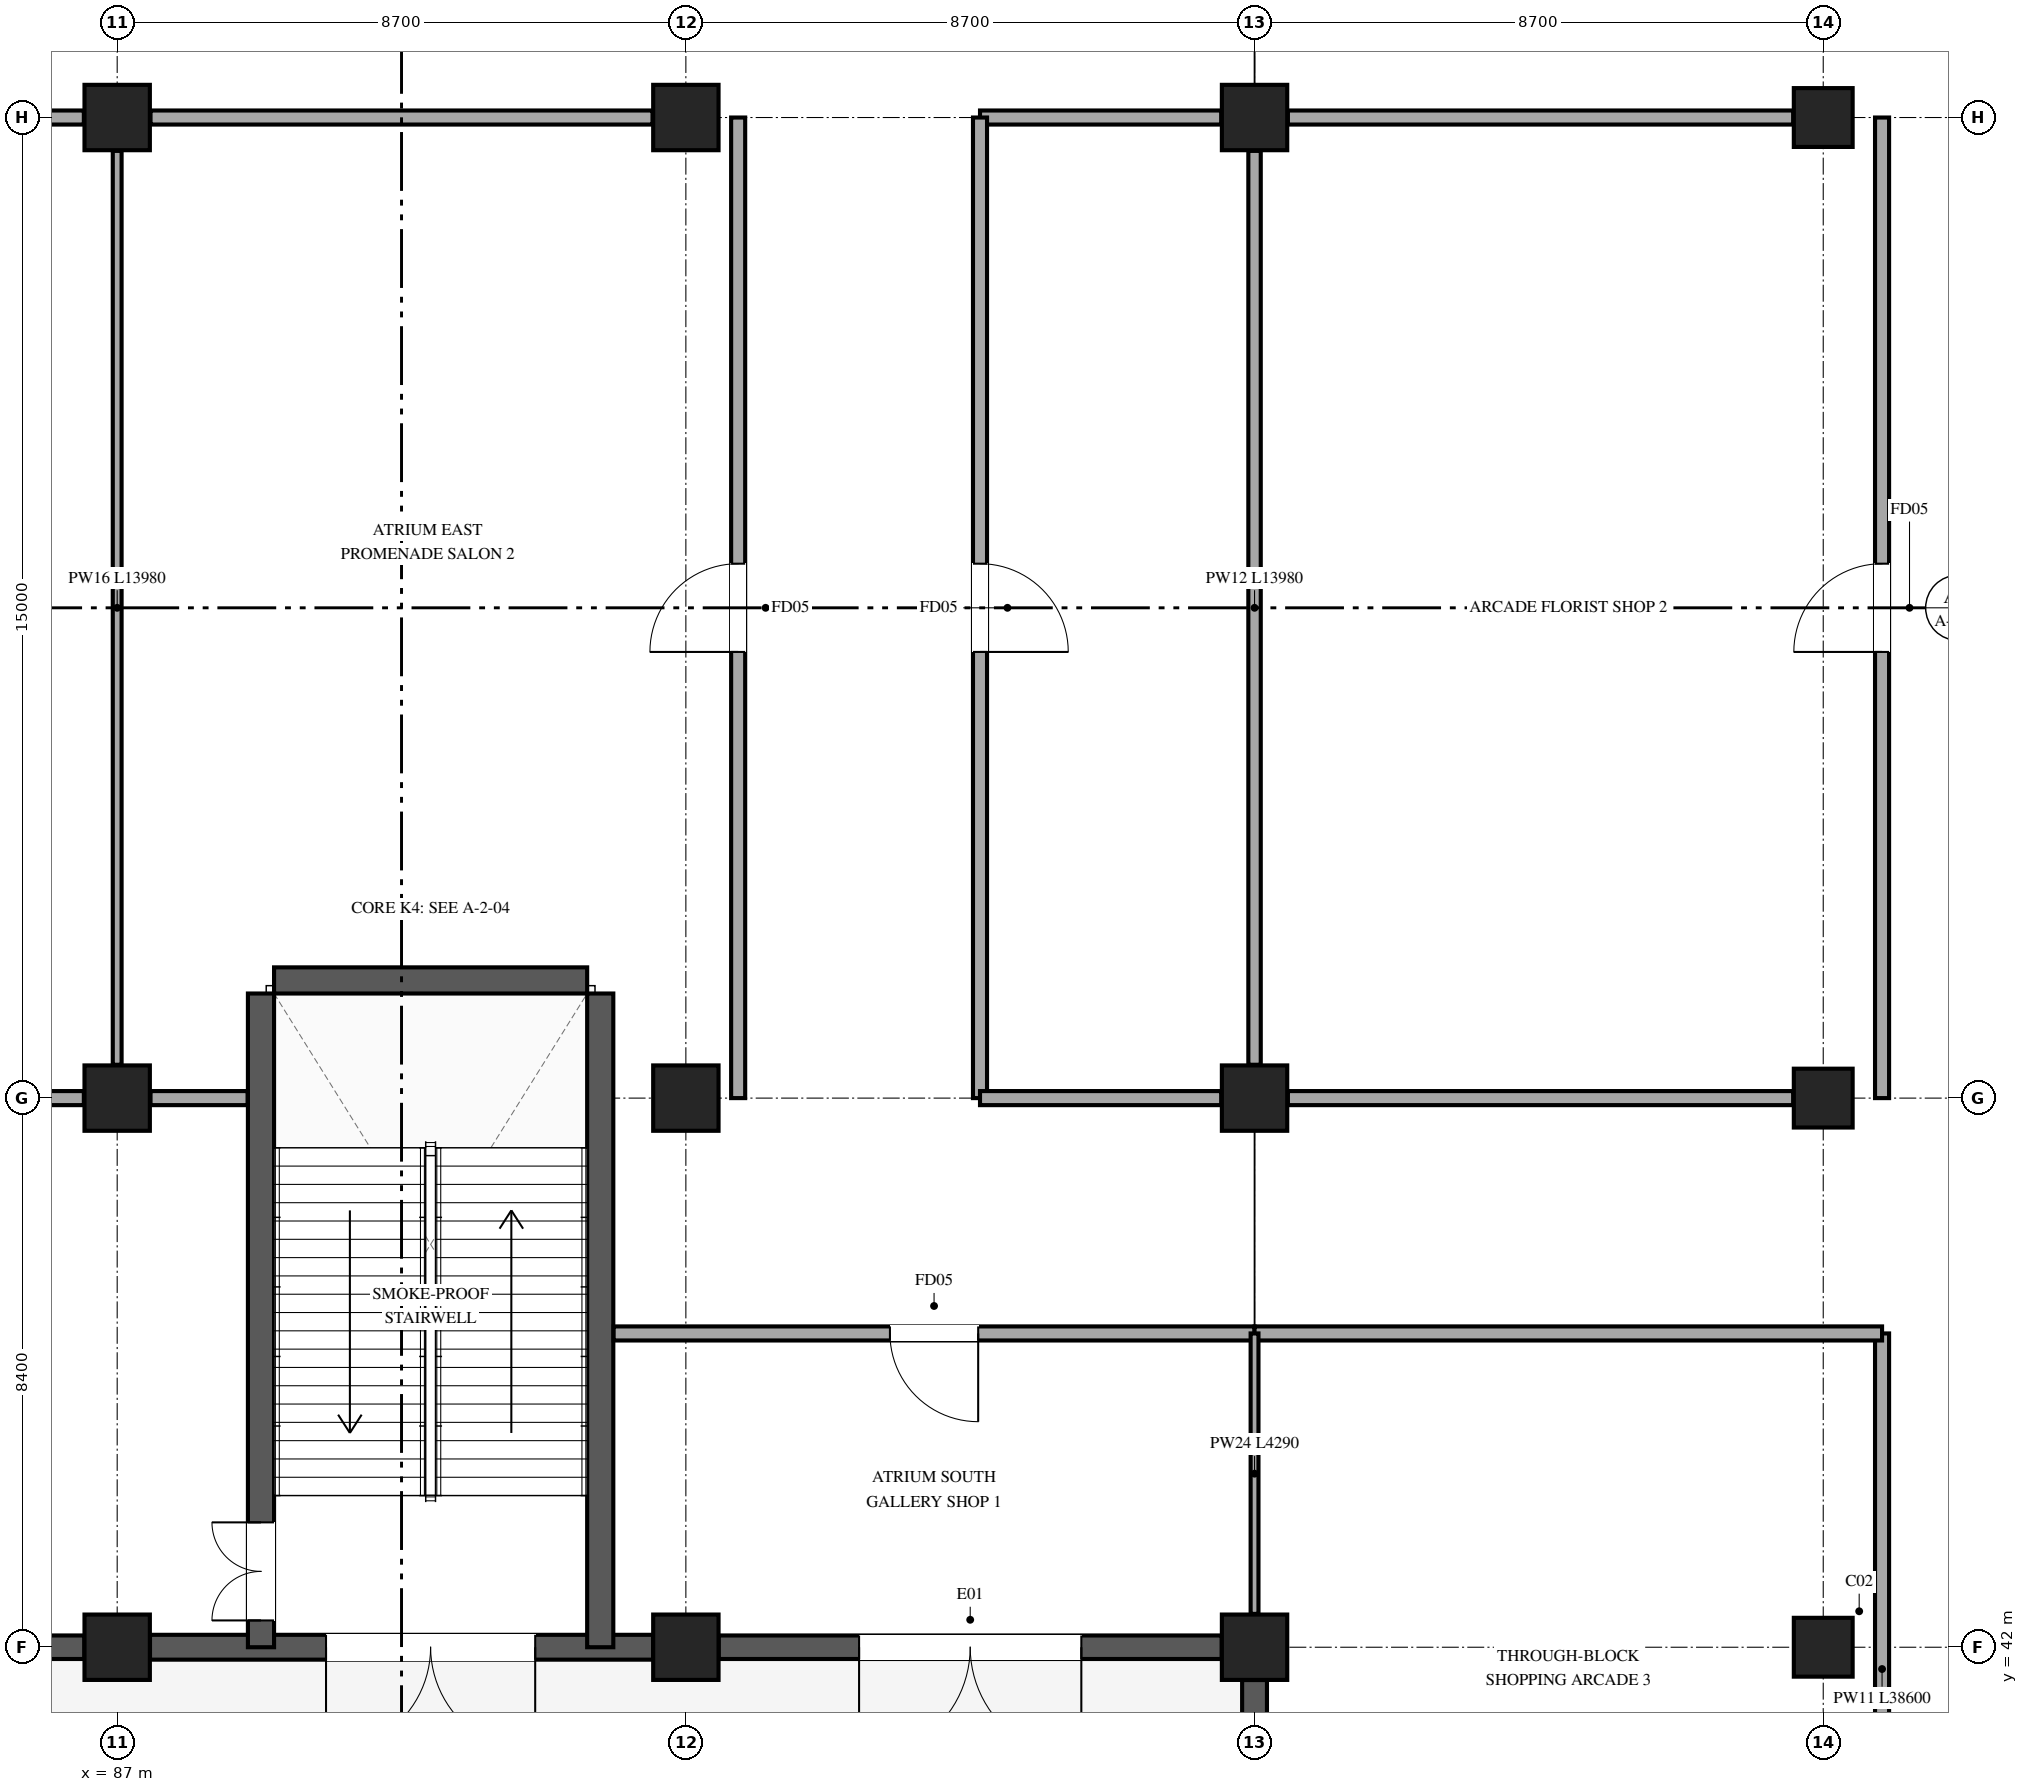
"""IFC4 building model, lengths in metres.
Left out: names, types, materials, properties, quantities, classifications, styles, units other than length and angle.
Written with IfcOpenShell. Run it as: python <this file> out.ifc"""

import sys

from ifc_helpers import new_model, si_unit, direction, frame, frame_2d, origin, origin_2d, place, context, subcontext, project, spatial, rectangle, extrude, element, fill, save


model = new_model("IFC4")
c1 = context("Model", 3, precision=1e-05, world=origin(), true_north=direction((0.0, 1.0)))
c2 = subcontext(c1, "Body", "Model", "MODEL_VIEW")
j1 = project(units=[si_unit("LENGTHUNIT", "METRE"), si_unit("PLANEANGLEUNIT", "RADIAN")], contexts=[c1])
p1 = place(None, origin())
s1 = spatial("IfcSite", under=j1, at=p1, CompositionType="ELEMENT")
p2 = place(p1, origin())
s2 = spatial("IfcBuilding", under=s1, at=p2, CompositionType="ELEMENT")
p3 = place(p2, origin())
s3 = spatial("IfcBuildingStorey", under=s2, at=p3, CompositionType="ELEMENT", Elevation=0.0)
for number, where, z_axis, x_axis in (
    (1, (87.0, 42.0, 0.0), (0.0, 0.0, 1.0), (1.0, 0.0, 0.0)),
    (2, (87.0, 50.4, 0.0), (0.0, 0.0, 1.0), (1.0, 0.0, 0.0)),
    (3, (87.0, 65.4, 0.0), (0.0, 0.0, 1.0), (1.0, 0.0, 0.0)),
    (4, (95.7, 42.0, 0.0), (0.0, 0.0, 1.0), (1.0, 0.0, 0.0)),
    (5, (95.7, 50.4, 0.0), (0.0, 0.0, 1.0), (1.0, 0.0, 0.0)),
    (6, (95.7, 65.4, 0.0), (0.0, 0.0, 1.0), (1.0, 0.0, 0.0)),
    (7, (104.4, 42.0, 0.0), (0.0, 0.0, 1.0), (1.0, 0.0, 0.0)),
    (8, (104.4, 50.4, 0.0), (0.0, 0.0, 1.0), (1.0, 0.0, 0.0)),
    (9, (104.4, 65.4, 0.0), (0.0, 0.0, 1.0), (1.0, 0.0, 0.0)),
):
    element("IfcColumn", number, at=place(p3, frame(where, z_axis=z_axis, x_axis=x_axis)), inside=s3, PredefinedType="COLUMN", context=c2, shape_type="SweptSolid", body=[
        extrude(rectangle(XDim=1.0, YDim=1.0, at=origin_2d()), origin(), (0.0, 0.0, 1.0), 6.0),
    ])
for number, where, z_axis, x_axis in (
    (10, (113.1, 42.0, 0.0), (0.0, 0.0, 1.0), (1.0, 0.0, 0.0)),
    (11, (113.1, 50.4, 0.0), (0.0, 0.0, 1.0), (1.0, 0.0, 0.0)),
    (12, (113.1, 65.4, 0.0), (0.0, 0.0, 1.0), (1.0, 0.0, 0.0)),
):
    element("IfcColumn", number, at=place(p3, frame(where, z_axis=z_axis, x_axis=x_axis)), inside=s3, PredefinedType="COLUMN", context=c2, shape_type="SweptSolid", body=[
        extrude(rectangle(XDim=0.9, YDim=0.9, at=origin_2d()), origin(), (0.0, 0.0, 1.0), 6.0),
    ])
p4 = place(p3, frame((104.4, 34.052, 0.0), z_axis=(0.0, 0.0, 1.0), x_axis=(0.0, 1.0, 0.0)))
e13 = element("IfcWall", 13, at=p4, inside=s3, PredefinedType="STANDARD", context=c2, shape_type="SweptSolid", body=[
    extrude(rectangle(XDim=7.446, YDim=0.38, at=frame_2d((3.723, 0.0))), origin(), (0.0, 0.0, 1.0), 5.66),
])
p5 = place(p4, frame((2.323, 0.0, 0.0)))
e14 = element("IfcOpeningElement", 14, at=p5, cuts=e13, PredefinedType="OPENING", context=c2, shape_type="SweptSolid", body=[
    extrude(rectangle(XDim=2.8, YDim=2.5, at=frame_2d((1.4, 1.25))), frame((0.0, 0.2, 0.0), z_axis=(0.0, -1.0, 0.0), x_axis=(1.0, 0.0, 0.0)), (0.0, 0.0, 1.0), 0.4),
])
p6 = place(p3, frame((103.898, 42.0, 0.0), z_axis=(0.0, 0.0, 1.0), x_axis=(-1.0, 0.0, 0.0)))
e15 = element("IfcWall", 15, at=p6, inside=s3, PredefinedType="STANDARD", context=c2, shape_type="SweptSolid", body=[
    extrude(rectangle(XDim=7.696, YDim=0.36, at=frame_2d((3.848, 0.0))), origin(), (0.0, 0.0, 1.0), 5.66),
])
p7 = place(p6, frame((2.148, 0.0, 0.0)))
e16 = element("IfcOpeningElement", 16, at=p7, cuts=e15, PredefinedType="OPENING", context=c2, shape_type="SweptSolid", body=[
    extrude(rectangle(XDim=3.4, YDim=2.8, at=frame_2d((1.7, 1.4))), frame((0.0, 0.19, 0.0), z_axis=(0.0, -1.0, 0.0), x_axis=(1.0, 0.0, 0.0)), (0.0, 0.0, 1.0), 0.38),
])
p8 = place(p3, frame((95.198, 42.0, 0.0), z_axis=(0.0, 0.0, 1.0), x_axis=(-1.0, 0.0, 0.0)))
e17 = element("IfcWall", 17, at=p8, inside=s3, PredefinedType="STANDARD", context=c2, shape_type="SweptSolid", body=[
    extrude(rectangle(XDim=7.696, YDim=0.38, at=frame_2d((3.848, 0.0))), origin(), (0.0, 0.0, 1.0), 5.66),
])
p9 = place(p8, frame((1.803, 0.0, 0.0)))
e18 = element("IfcOpeningElement", 18, at=p9, cuts=e17, PredefinedType="OPENING", context=c2, shape_type="SweptSolid", body=[
    extrude(rectangle(XDim=3.2, YDim=2.4, at=frame_2d((1.6, 1.2))), frame((0.0, 0.2, 0.0), z_axis=(0.0, -1.0, 0.0), x_axis=(1.0, 0.0, 0.0)), (0.0, 0.0, 1.0), 0.4),
])
p10 = place(p3, frame((86.498, 42.0, 0.0), z_axis=(0.0, 0.0, 1.0), x_axis=(-1.0, 0.0, 0.0)))
e19 = element("IfcWall", 19, at=p10, inside=s3, PredefinedType="STANDARD", context=c2, shape_type="SweptSolid", body=[
    extrude(rectangle(XDim=7.696, YDim=0.36, at=frame_2d((3.848, 0.0))), origin(), (0.0, 0.0, 1.0), 5.66),
])
p11 = place(p10, frame((4.348, 0.0, 0.0)))
e20 = element("IfcOpeningElement", 20, at=p11, cuts=e19, PredefinedType="OPENING", context=c2, shape_type="SweptSolid", body=[
    extrude(rectangle(XDim=3.0, YDim=2.6, at=frame_2d((1.5, 1.3))), frame((0.0, 0.19, 0.0), z_axis=(0.0, -1.0, 0.0), x_axis=(1.0, 0.0, 0.0)), (0.0, 0.0, 1.0), 0.38),
])
p12 = place(p3, frame((89.2, 42.0, 0.0), z_axis=(0.0, 0.0, 1.0), x_axis=(0.0, 1.0, 0.0)))
e21 = element("IfcWall", 21, at=p12, inside=s3, PredefinedType="SHEAR", context=c2, shape_type="SweptSolid", body=[
    extrude(rectangle(XDim=10.0, YDim=0.4, at=frame_2d((5.0, 0.0))), origin(), (0.0, 0.0, 1.0), 6.0),
])
p13 = place(p12, frame((0.41, 0.0, 0.0)))
e22 = element("IfcOpeningElement", 22, at=p13, cuts=e21, PredefinedType="OPENING", context=c2, shape_type="SweptSolid", body=[
    extrude(rectangle(XDim=1.5, YDim=2.2, at=frame_2d((0.75, 1.1))), frame((0.0, 0.21, 0.0), z_axis=(0.0, -1.0, 0.0), x_axis=(1.0, 0.0, 0.0)), (0.0, 0.0, 1.0), 0.42),
])
p14 = place(p3, frame((94.39, 52.0, 0.0), z_axis=(0.0, 0.0, 1.0), x_axis=(0.0, -1.0, 0.0)))
e23 = element("IfcWall", 23, at=p14, inside=s3, PredefinedType="SHEAR", context=c2, shape_type="SweptSolid", body=[
    extrude(rectangle(XDim=10.0, YDim=0.4, at=frame_2d((5.0, 0.0))), origin(), (0.0, 0.0, 1.0), 6.0),
])
p15 = place(p3, frame((89.4, 52.2, 0.0), z_axis=(0.0, 0.0, 1.0), x_axis=(1.0, 0.0, 0.0)))
e24 = element("IfcWall", 24, at=p15, inside=s3, PredefinedType="SHEAR", context=c2, shape_type="SweptSolid", body=[
    extrude(rectangle(XDim=4.79, YDim=0.4, at=frame_2d((2.395, 0.0))), origin(), (0.0, 0.0, 1.0), 6.0),
])
p16 = place(p3, frame((78.81, 50.4, 0.0), z_axis=(0.0, 0.0, 1.0), x_axis=(1.0, 0.0, 0.0)))
e25 = element("IfcWall", 25, at=p16, inside=s3, PredefinedType="PARTITIONING", context=c2, shape_type="SweptSolid", body=[
    extrude(rectangle(XDim=7.68, YDim=0.215, at=frame_2d((3.84, 0.0))), origin(), (0.0, 0.0, 1.0), 4.51),
])
p17 = place(p3, frame((86.49, 65.4, 0.0), z_axis=(0.0, 0.0, 1.0), x_axis=(-1.0, 0.0, 0.0)))
e26 = element("IfcWall", 26, at=p17, inside=s3, PredefinedType="PARTITIONING", context=c2, shape_type="SweptSolid", body=[
    extrude(rectangle(XDim=7.68, YDim=0.215, at=frame_2d((3.84, 0.0))), origin(), (0.0, 0.0, 1.0), 4.91),
])
p18 = place(p3, frame((104.4, 46.8, 0.0), z_axis=(0.0, 0.0, 1.0), x_axis=(-1.0, 0.0, 0.0)))
e27 = element("IfcWall", 27, at=p18, inside=s3, PredefinedType="PARTITIONING", context=c2, shape_type="SweptSolid", body=[
    extrude(rectangle(XDim=9.805, YDim=0.215, at=frame_2d((4.902, 0.0))), origin(), (0.0, 0.0, 1.0), 4.91),
])
p19 = place(p18, frame((4.228, 0.0, 0.0)))
e28 = element("IfcOpeningElement", 28, at=p19, cuts=e27, PredefinedType="OPENING", context=c2, shape_type="SweptSolid", body=[
    extrude(rectangle(XDim=1.35, YDim=2.2, at=frame_2d((0.675, 1.1))), frame((0.0, 0.118, 0.0), z_axis=(0.0, -1.0, 0.0), x_axis=(1.0, 0.0, 0.0)), (0.0, 0.0, 1.0), 0.235),
])
p20 = place(p3, frame((103.89, 65.4, 0.0), z_axis=(0.0, 0.0, 1.0), x_axis=(-1.0, 0.0, 0.0)))
e29 = element("IfcWall", 29, at=p20, inside=s3, PredefinedType="PARTITIONING", context=c2, shape_type="SweptSolid", body=[
    extrude(rectangle(XDim=3.69, YDim=0.215, at=frame_2d((1.845, 0.0))), origin(), (0.0, 0.0, 1.0), 4.91),
])
p21 = place(p3, frame((100.2, 65.4, 0.0), z_axis=(0.0, 0.0, 1.0), x_axis=(0.0, -1.0, 0.0)))
e30 = element("IfcWall", 30, at=p21, inside=s3, PredefinedType="PARTITIONING", context=c2, shape_type="SweptSolid", body=[
    extrude(rectangle(XDim=15.0, YDim=0.215, at=frame_2d((7.5, 0.0))), origin(), (0.0, 0.0, 1.0), 4.91),
])
p22 = place(p21, frame((6.825, 0.0, 0.0)))
e31 = element("IfcOpeningElement", 31, at=p22, cuts=e30, PredefinedType="OPENING", context=c2, shape_type="SweptSolid", body=[
    extrude(rectangle(XDim=1.35, YDim=2.2, at=frame_2d((0.675, 1.1))), frame((0.0, 0.118, 0.0), z_axis=(0.0, -1.0, 0.0), x_axis=(1.0, 0.0, 0.0)), (0.0, 0.0, 1.0), 0.235),
])
p23 = place(p3, frame((100.2, 50.4, 0.0), z_axis=(0.0, 0.0, 1.0), x_axis=(1.0, 0.0, 0.0)))
e32 = element("IfcWall", 32, at=p23, inside=s3, PredefinedType="PARTITIONING", context=c2, shape_type="SweptSolid", body=[
    extrude(rectangle(XDim=3.69, YDim=0.215, at=frame_2d((1.845, 0.0))), origin(), (0.0, 0.0, 1.0), 4.91),
])
p24 = place(p3, frame((87.51, 50.4, 0.0), z_axis=(0.0, 0.0, 1.0), x_axis=(1.0, 0.0, 0.0)))
e33 = element("IfcWall", 33, at=p24, inside=s3, PredefinedType="PARTITIONING", context=c2, shape_type="SweptSolid", body=[
    extrude(rectangle(XDim=1.485, YDim=0.215, at=frame_2d((0.743, 0.0))), origin(), (0.0, 0.0, 1.0), 5.66),
])
p25 = place(p3, frame((96.5, 50.4, 0.0), z_axis=(0.0, 0.0, 1.0), x_axis=(0.0, 1.0, 0.0)))
e34 = element("IfcWall", 34, at=p25, inside=s3, PredefinedType="PARTITIONING", context=c2, shape_type="SweptSolid", body=[
    extrude(rectangle(XDim=15.0, YDim=0.215, at=frame_2d((7.5, 0.0))), origin(), (0.0, 0.0, 1.0), 4.91),
])
p26 = place(p25, frame((6.825, 0.0, 0.0)))
e35 = element("IfcOpeningElement", 35, at=p26, cuts=e34, PredefinedType="OPENING", context=c2, shape_type="SweptSolid", body=[
    extrude(rectangle(XDim=1.35, YDim=2.2, at=frame_2d((0.675, 1.1))), frame((0.0, 0.118, 0.0), z_axis=(0.0, -1.0, 0.0), x_axis=(1.0, 0.0, 0.0)), (0.0, 0.0, 1.0), 0.235),
])
p27 = place(p3, frame((95.19, 65.4, 0.0), z_axis=(0.0, 0.0, 1.0), x_axis=(-1.0, 0.0, 0.0)))
e36 = element("IfcWall", 36, at=p27, inside=s3, PredefinedType="PARTITIONING", context=c2, shape_type="SweptSolid", body=[
    extrude(rectangle(XDim=7.68, YDim=0.215, at=frame_2d((3.84, 0.0))), origin(), (0.0, 0.0, 1.0), 4.91),
])
p28 = place(p3, frame((114.0, 8.2, 0.0), z_axis=(0.0, 0.0, 1.0), x_axis=(0.0, 1.0, 0.0)))
e37 = element("IfcWall", 37, at=p28, inside=s3, PredefinedType="PARTITIONING", context=c2, shape_type="SweptSolid", body=[
    extrude(rectangle(XDim=38.6, YDim=0.215, at=frame_2d((19.3, 0.0))), origin(), (0.0, 0.0, 1.0), 4.91),
])
p29 = place(p28, frame((18.625, 0.0, 0.0)))
e38 = element("IfcOpeningElement", 38, at=p29, cuts=e37, PredefinedType="OPENING", context=c2, shape_type="SweptSolid", body=[
    extrude(rectangle(XDim=1.35, YDim=2.2, at=frame_2d((0.675, 1.1))), frame((0.0, 0.118, 0.0), z_axis=(0.0, -1.0, 0.0), x_axis=(1.0, 0.0, 0.0)), (0.0, 0.0, 1.0), 0.235),
])
p30 = place(p3, frame((114.0, 46.8, 0.0), z_axis=(0.0, 0.0, 1.0), x_axis=(-1.0, 0.0, 0.0)))
e39 = element("IfcWall", 39, at=p30, inside=s3, PredefinedType="PARTITIONING", context=c2, shape_type="SweptSolid", body=[
    extrude(rectangle(XDim=9.6, YDim=0.215, at=frame_2d((4.8, 0.0))), origin(), (0.0, 0.0, 1.0), 4.91),
])
p31 = place(p3, frame((104.91, 50.4, 0.0), z_axis=(0.0, 0.0, 1.0), x_axis=(1.0, 0.0, 0.0)))
e40 = element("IfcWall", 40, at=p31, inside=s3, PredefinedType="PARTITIONING", context=c2, shape_type="SweptSolid", body=[
    extrude(rectangle(XDim=7.73, YDim=0.215, at=frame_2d((3.865, 0.0))), origin(), (0.0, 0.0, 1.0), 4.51),
])
p32 = place(p3, frame((114.0, 50.4, 0.0), z_axis=(0.0, 0.0, 1.0), x_axis=(0.0, 1.0, 0.0)))
e41 = element("IfcWall", 41, at=p32, inside=s3, PredefinedType="PARTITIONING", context=c2, shape_type="SweptSolid", body=[
    extrude(rectangle(XDim=15.0, YDim=0.215, at=frame_2d((7.5, 0.0))), origin(), (0.0, 0.0, 1.0), 4.91),
])
p33 = place(p32, frame((6.825, 0.0, 0.0)))
e42 = element("IfcOpeningElement", 42, at=p33, cuts=e41, PredefinedType="OPENING", context=c2, shape_type="SweptSolid", body=[
    extrude(rectangle(XDim=1.35, YDim=2.2, at=frame_2d((0.675, 1.1))), frame((0.0, 0.118, 0.0), z_axis=(0.0, -1.0, 0.0), x_axis=(1.0, 0.0, 0.0)), (0.0, 0.0, 1.0), 0.235),
])
p34 = place(p3, frame((112.64, 65.4, 0.0), z_axis=(0.0, 0.0, 1.0), x_axis=(-1.0, 0.0, 0.0)))
e43 = element("IfcWall", 43, at=p34, inside=s3, PredefinedType="PARTITIONING", context=c2, shape_type="SweptSolid", body=[
    extrude(rectangle(XDim=7.73, YDim=0.215, at=frame_2d((3.865, 0.0))), origin(), (0.0, 0.0, 1.0), 4.91),
])
p35 = place(p3, frame((87.0, 64.89, 0.0), z_axis=(0.0, 0.0, 1.0), x_axis=(0.0, -1.0, 0.0)))
e44 = element("IfcWall", 44, at=p35, inside=s3, PredefinedType="PARTITIONING", context=c2, shape_type="SweptSolid", body=[
    extrude(rectangle(XDim=13.98, YDim=0.135, at=frame_2d((6.99, 0.0))), origin(), (0.0, 0.0, 1.0), 5.222),
])
p36 = place(p3, frame((104.4, 46.8, 0.0), z_axis=(0.0, 0.0, 1.0), x_axis=(0.0, -1.0, 0.0)))
e45 = element("IfcWall", 45, at=p36, inside=s3, PredefinedType="PARTITIONING", context=c2, shape_type="SweptSolid", body=[
    extrude(rectangle(XDim=4.29, YDim=0.12, at=frame_2d((2.145, 0.0))), origin(), (0.0, 0.0, 1.0), 4.91),
])
p37 = place(p3, frame((104.4, 64.89, 0.0), z_axis=(0.0, 0.0, 1.0), x_axis=(0.0, -1.0, 0.0)))
e46 = element("IfcWall", 46, at=p37, inside=s3, PredefinedType="PARTITIONING", context=c2, shape_type="SweptSolid", body=[
    extrude(rectangle(XDim=13.98, YDim=0.19, at=frame_2d((6.99, 0.0))), origin(), (0.0, 0.0, 1.0), 5.222),
])
p38 = place(p7, origin())
e47 = element("IfcDoor", 47, at=p38, inside=s3, OperationType="DOUBLE_DOOR_SINGLE_SWING", PredefinedType="DOOR", context=c2, shape_type="SweptSolid", body=[
    extrude(rectangle(XDim=3.4, YDim=2.8, at=frame_2d((1.7, 1.4))), frame((0.0, 0.025, 0.0), z_axis=(0.0, -1.0, 0.0), x_axis=(1.0, 0.0, 0.0)), (0.0, 0.0, 1.0), 0.05),
])
fill(e16, e47)
p39 = place(p9, origin())
e48 = element("IfcDoor", 48, at=p39, inside=s3, OperationType="DOUBLE_DOOR_SINGLE_SWING", PredefinedType="USERDEFINED", context=c2, shape_type="SweptSolid", body=[
    extrude(rectangle(XDim=3.2, YDim=2.4, at=frame_2d((1.6, 1.2))), frame((0.0, 0.025, 0.0), z_axis=(0.0, -1.0, 0.0), x_axis=(1.0, 0.0, 0.0)), (0.0, 0.0, 1.0), 0.05),
])
fill(e18, e48)
p40 = place(p13, origin())
e49 = element("IfcDoor", 49, at=p40, inside=s3, OperationType="DOUBLE_DOOR_SINGLE_SWING", PredefinedType="DOOR", context=c2, shape_type="SweptSolid", body=[
    extrude(rectangle(XDim=1.5, YDim=2.2, at=frame_2d((0.75, 1.1))), frame((0.0, 0.025, 0.0), z_axis=(0.0, -1.0, 0.0), x_axis=(1.0, 0.0, 0.0)), (0.0, 0.0, 1.0), 0.05),
])
fill(e22, e49)
p41 = place(p19, origin())
e50 = element("IfcDoor", 50, at=p41, inside=s3, OperationType="SINGLE_SWING_LEFT", PredefinedType="DOOR", context=c2, shape_type="SweptSolid", body=[
    extrude(rectangle(XDim=1.35, YDim=2.2, at=frame_2d((0.675, 1.1))), frame((0.0, 0.025, 0.0), z_axis=(0.0, -1.0, 0.0), x_axis=(1.0, 0.0, 0.0)), (0.0, 0.0, 1.0), 0.05),
])
fill(e28, e50)
p42 = place(p22, origin())
e51 = element("IfcDoor", 51, at=p42, inside=s3, OperationType="SINGLE_SWING_RIGHT", PredefinedType="DOOR", context=c2, shape_type="SweptSolid", body=[
    extrude(rectangle(XDim=1.35, YDim=2.2, at=frame_2d((0.675, 1.1))), frame((0.0, 0.025, 0.0), z_axis=(0.0, -1.0, 0.0), x_axis=(1.0, 0.0, 0.0)), (0.0, 0.0, 1.0), 0.05),
])
fill(e31, e51)
p43 = place(p26, origin())
e52 = element("IfcDoor", 52, at=p43, inside=s3, OperationType="SINGLE_SWING_LEFT", PredefinedType="DOOR", context=c2, shape_type="SweptSolid", body=[
    extrude(rectangle(XDim=1.35, YDim=2.2, at=frame_2d((0.675, 1.1))), frame((0.0, 0.025, 0.0), z_axis=(0.0, -1.0, 0.0), x_axis=(1.0, 0.0, 0.0)), (0.0, 0.0, 1.0), 0.05),
])
fill(e35, e52)
p44 = place(p33, origin())
e53 = element("IfcDoor", 53, at=p44, inside=s3, OperationType="SINGLE_SWING_LEFT", PredefinedType="DOOR", context=c2, shape_type="SweptSolid", body=[
    extrude(rectangle(XDim=1.35, YDim=2.2, at=frame_2d((0.675, 1.1))), frame((0.0, 0.025, 0.0), z_axis=(0.0, -1.0, 0.0), x_axis=(1.0, 0.0, 0.0)), (0.0, 0.0, 1.0), 0.05),
])
fill(e42, e53)
save(model, sys.argv[1])
